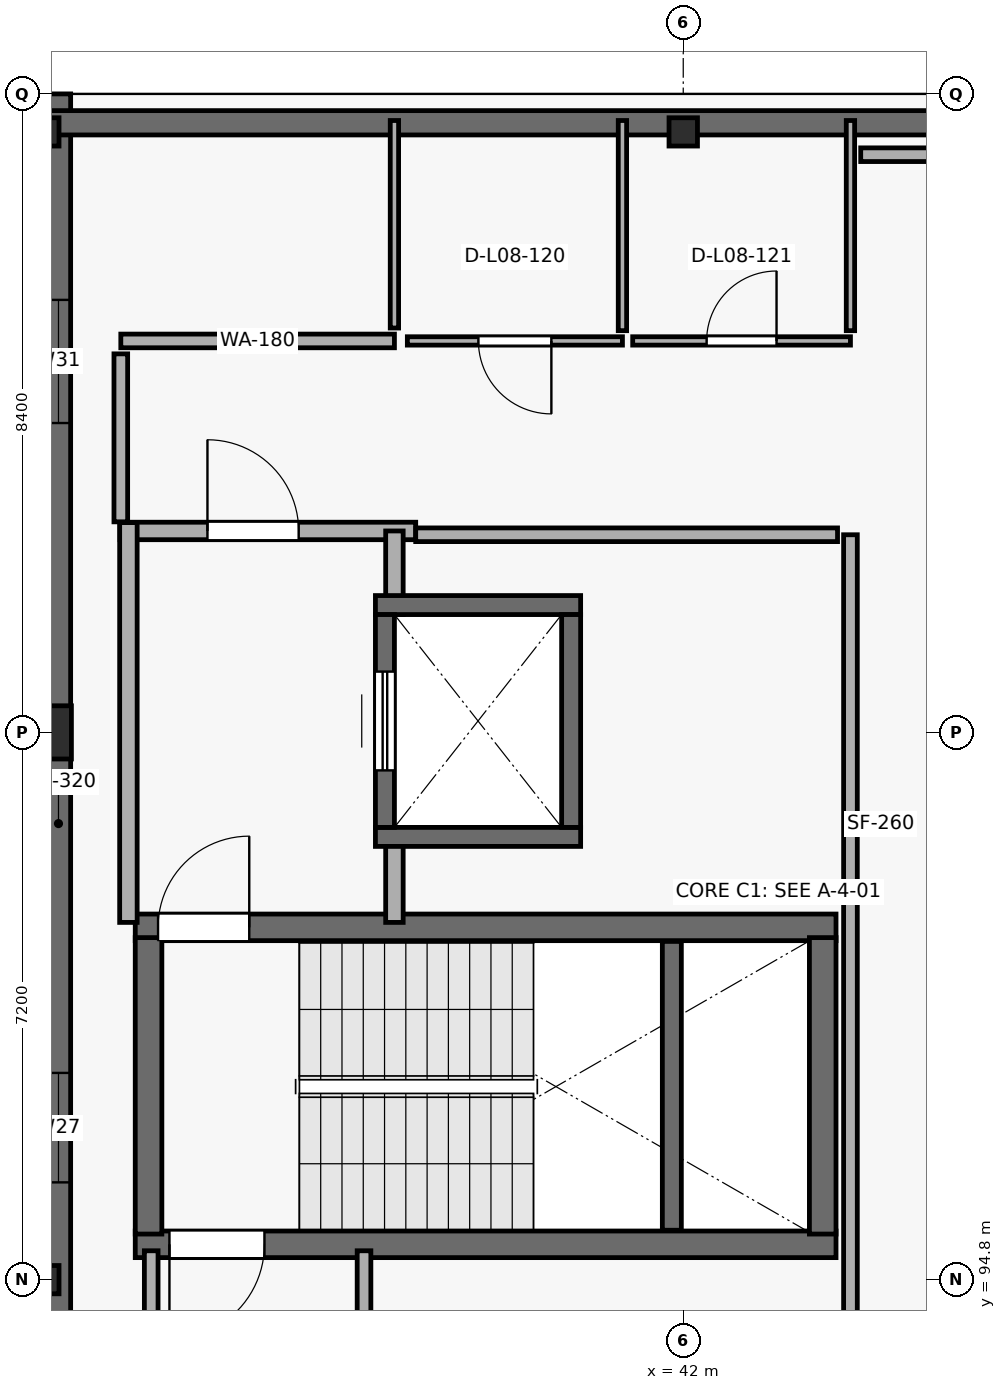
"""IFC4 building model, lengths in metres.
Left out: names, types, materials, properties, quantities, classifications, styles, units other than length and angle.
Written with IfcOpenShell. Run it as: python <this file> out.ifc"""

import sys

from ifc_helpers import new_model, si_unit, direction, frame, frame_2d, origin, origin_2d, place, context, subcontext, project, spatial, rectangle, i_section, extrude, element, fill, save


model = new_model("IFC4")
c1 = context("Model", 3, precision=1e-05, world=origin(), true_north=direction((0.0, 1.0)))
c2 = subcontext(c1, "Body", "Model", "MODEL_VIEW")
j1 = project(units=[si_unit("LENGTHUNIT", "METRE"), si_unit("PLANEANGLEUNIT", "RADIAN")], contexts=[c1])
p1 = place(None, origin())
s1 = spatial("IfcSite", under=j1, at=p1, CompositionType="ELEMENT")
p2 = place(p1, origin())
s2 = spatial("IfcBuilding", under=s1, at=p2, CompositionType="ELEMENT")
p3 = place(p2, frame((0.0, 0.0, 35.7)))
s3 = spatial("IfcBuildingStorey", under=s2, at=p3, CompositionType="ELEMENT", Elevation=35.7)
p4 = place(p3, frame((33.6, 94.8, 0.0), z_axis=(0.0, 0.0, 1.0), x_axis=(1.0, 0.0, 0.0)))
e1 = element("IfcColumn", 1, at=p4, inside=s3, PredefinedType="COLUMN", context=c2, shape_type="SweptSolid", body=[
    extrude(i_section(OverallWidth=0.374, OverallDepth=0.372, WebThickness=0.016, FlangeThickness=0.026, at=origin_2d()), origin(), (0.0, 0.0, 1.0), 4.5),
])
p5 = place(p3, frame((33.6, 102.0, 0.0), z_axis=(0.0, 0.0, 1.0), x_axis=(1.0, 0.0, 0.0)))
e2 = element("IfcColumn", 2, at=p5, inside=s3, PredefinedType="COLUMN", context=c2, shape_type="SweptSolid", body=[
    extrude(rectangle(XDim=0.7, YDim=0.7, at=origin_2d()), origin(), (0.0, 0.0, 1.0), 4.5),
])
for number, where, z_axis, x_axis in (
    (3, (33.6, 109.9, 0.0), (0.0, 0.0, 1.0), (1.0, 0.0, 0.0)),
    (4, (42.0, 109.9, 0.0), (0.0, 0.0, 1.0), (1.0, 0.0, 0.0)),
):
    element("IfcColumn", number, at=place(p3, frame(where, z_axis=z_axis, x_axis=x_axis)), inside=s3, PredefinedType="COLUMN", context=c2, shape_type="SweptSolid", body=[
        extrude(i_section(OverallWidth=0.374, OverallDepth=0.372, WebThickness=0.016, FlangeThickness=0.026, at=origin_2d()), origin(), (0.0, 0.0, 1.0), 4.5),
    ])
p6 = place(p3, frame((33.78, 91.2, 0.0), z_axis=(0.0, 0.0, 1.0), x_axis=(0.0, 1.0, 0.0)))
e5 = element("IfcWall", 5, at=p6, inside=s3, PredefinedType="SOLIDWALL", context=c2, shape_type="SweptSolid", body=[
    extrude(rectangle(XDim=19.2, YDim=0.32, at=frame_2d((9.6, 0.0))), origin(), (0.0, 0.0, 1.0), 4.24),
])
p7 = place(p6, frame((4.88, 0.0, 0.75)))
e6 = element("IfcOpeningElement", 6, at=p7, cuts=e5, PredefinedType="OPENING", context=c2, shape_type="SweptSolid", body=[
    extrude(rectangle(XDim=1.44, YDim=2.25, at=frame_2d((0.72, 1.125))), frame((0.0, 0.17, 0.0), z_axis=(0.0, -1.0, 0.0), x_axis=(1.0, 0.0, 0.0)), (0.0, 0.0, 1.0), 0.34),
])
p8 = place(p6, frame((14.87, 0.0, 0.75)))
e7 = element("IfcOpeningElement", 7, at=p8, cuts=e5, PredefinedType="OPENING", context=c2, shape_type="SweptSolid", body=[
    extrude(rectangle(XDim=1.62, YDim=1.85, at=frame_2d((0.81, 0.925))), frame((0.0, 0.17, 0.0), z_axis=(0.0, -1.0, 0.0), x_axis=(1.0, 0.0, 0.0)), (0.0, 0.0, 1.0), 0.34),
])
p9 = place(p3, frame((33.6, 110.02, 0.0), z_axis=(0.0, 0.0, 1.0), x_axis=(1.0, 0.0, 0.0)))
e8 = element("IfcWall", 8, at=p9, inside=s3, PredefinedType="SOLIDWALL", context=c2, shape_type="SweptSolid", body=[
    extrude(rectangle(XDim=33.6, YDim=0.32, at=frame_2d((16.8, 0.0))), origin(), (0.0, 0.0, 1.0), 4.24),
])
p10 = place(p3, frame((34.79, 95.265, 0.0), z_axis=(0.0, 0.0, 1.0), x_axis=(1.0, 0.0, 0.0)))
e9 = element("IfcWall", 9, at=p10, inside=s3, PredefinedType="SHEAR", context=c2, shape_type="SweptSolid", body=[
    extrude(rectangle(XDim=9.22, YDim=0.35, at=frame_2d((4.61, 0.0))), origin(), (0.0, 0.0, 1.0), 4.24),
])
p11 = place(p10, frame((0.45, 0.0, 0.0)))
e10 = element("IfcOpeningElement", 10, at=p11, cuts=e9, PredefinedType="OPENING", context=c2, shape_type="SweptSolid", body=[
    extrude(rectangle(XDim=1.25, YDim=2.2, at=frame_2d((0.625, 1.1))), frame((0.0, 0.185, 0.0), z_axis=(0.0, -1.0, 0.0), x_axis=(1.0, 0.0, 0.0)), (0.0, 0.0, 1.0), 0.37),
])
p12 = place(p3, frame((44.01, 99.435, 0.0), z_axis=(0.0, 0.0, 1.0), x_axis=(-1.0, 0.0, 0.0)))
e11 = element("IfcWall", 11, at=p12, inside=s3, PredefinedType="SHEAR", context=c2, shape_type="SweptSolid", body=[
    extrude(rectangle(XDim=9.22, YDim=0.35, at=frame_2d((4.61, 0.0))), origin(), (0.0, 0.0, 1.0), 4.24),
])
p13 = place(p12, frame((7.72, 0.0, 0.0)))
e12 = element("IfcOpeningElement", 12, at=p13, cuts=e11, PredefinedType="OPENING", context=c2, shape_type="SweptSolid", body=[
    extrude(rectangle(XDim=1.2, YDim=2.2, at=frame_2d((0.6, 1.1))), frame((0.0, 0.185, 0.0), z_axis=(0.0, -1.0, 0.0), x_axis=(1.0, 0.0, 0.0)), (0.0, 0.0, 1.0), 0.37),
])
for number, where, z_axis, x_axis in (
    (13, (34.965, 95.4, 0.0), (0.0, 0.0, 1.0), (0.0, 1.0, 0.0)),
    (14, (43.835, 99.3, 0.0), (0.0, 0.0, 1.0), (0.0, -1.0, 0.0)),
):
    element("IfcWall", number, at=place(p3, frame(where, z_axis=z_axis, x_axis=x_axis)), inside=s3, PredefinedType="SHEAR", context=c2, shape_type="SweptSolid", body=[
        extrude(rectangle(XDim=3.9, YDim=0.35, at=frame_2d((1.95, 0.0))), origin(), (0.0, 0.0, 1.0), 4.24),
    ])
p14 = place(p3, frame((41.85, 95.45, 0.0), z_axis=(0.0, 0.0, 1.0), x_axis=(0.0, 1.0, 0.0)))
e15 = element("IfcWall", 15, at=p14, inside=s3, PredefinedType="SHEAR", context=c2, shape_type="SweptSolid", body=[
    extrude(rectangle(XDim=3.8, YDim=0.25, at=frame_2d((1.9, 0.0))), origin(), (0.0, 0.0, 1.0), 2.07),
])
p15 = place(p3, frame((34.59, 104.65, 0.0), z_axis=(0.0, 0.0, 1.0), x_axis=(1.0, 0.0, 0.0)))
e16 = element("IfcWall", 16, at=p15, inside=s3, PredefinedType="PARTITIONING", context=c2, shape_type="SweptSolid", body=[
    extrude(rectangle(XDim=3.89, YDim=0.23, at=frame_2d((1.945, 0.0))), origin(), (0.0, 0.0, 1.0), 4.24),
])
p16 = place(p15, frame((1.15, 0.0, 0.0)))
e17 = element("IfcOpeningElement", 17, at=p16, cuts=e16, PredefinedType="OPENING", context=c2, shape_type="SweptSolid", body=[
    extrude(rectangle(XDim=1.2, YDim=2.2, at=frame_2d((0.6, 1.1))), frame((0.0, 0.125, 0.0), z_axis=(0.0, -1.0, 0.0), x_axis=(1.0, 0.0, 0.0)), (0.0, 0.0, 1.0), 0.25),
])
p17 = place(p3, frame((34.7, 99.5, 0.0), z_axis=(0.0, 0.0, 1.0), x_axis=(0.0, 1.0, 0.0)))
e18 = element("IfcWall", 18, at=p17, inside=s3, PredefinedType="PARTITIONING", context=c2, shape_type="SweptSolid", body=[
    extrude(rectangle(XDim=5.26, YDim=0.23, at=frame_2d((2.63, 0.0))), origin(), (0.0, 0.0, 1.0), 4.24),
])
p18 = place(p3, frame((38.2, 104.65, 0.0), z_axis=(0.0, 0.0, 1.0), x_axis=(0.0, -1.0, 0.0)))
e19 = element("IfcWall", 19, at=p18, inside=s3, PredefinedType="PARTITIONING", context=c2, shape_type="SweptSolid", body=[
    extrude(rectangle(XDim=1.1, YDim=0.23, at=frame_2d((0.55, 0.0))), origin(), (0.0, 0.0, 1.0), 4.24),
])
p19 = place(p3, frame((38.2, 100.75, 0.0), z_axis=(0.0, 0.0, 1.0), x_axis=(0.0, -1.0, 0.0)))
e20 = element("IfcWall", 20, at=p19, inside=s3, PredefinedType="PARTITIONING", context=c2, shape_type="SweptSolid", body=[
    extrude(rectangle(XDim=1.25, YDim=0.23, at=frame_2d((0.625, 0.0))), origin(), (0.0, 0.0, 1.0), 4.24),
])
for number, where, z_axis, x_axis in (
    (21, (37.95, 100.625, 0.0), (0.0, 0.0, 1.0), (1.0, 0.0, 0.0)),
    (22, (40.65, 103.675, 0.0), (0.0, 0.0, 1.0), (-1.0, 0.0, 0.0)),
):
    element("IfcWall", number, at=place(p3, frame(where, z_axis=z_axis, x_axis=x_axis)), inside=s3, PredefinedType="SHEAR", context=c2, shape_type="SweptSolid", body=[
        extrude(rectangle(XDim=2.7, YDim=0.25, at=frame_2d((1.35, 0.0))), origin(), (0.0, 0.0, 1.0), 4.24),
    ])
p20 = place(p3, frame((38.075, 100.75, 0.0), z_axis=(0.0, 0.0, 1.0), x_axis=(0.0, 1.0, 0.0)))
e23 = element("IfcWall", 23, at=p20, inside=s3, PredefinedType="SHEAR", context=c2, shape_type="SweptSolid", body=[
    extrude(rectangle(XDim=2.8, YDim=0.25, at=frame_2d((1.4, 0.0))), origin(), (0.0, 0.0, 1.0), 4.24),
])
p21 = place(p20, frame((0.75, 0.0, 0.0)))
e24 = element("IfcOpeningElement", 24, at=p21, cuts=e23, PredefinedType="OPENING", context=c2, shape_type="SweptSolid", body=[
    extrude(rectangle(XDim=1.3, YDim=2.25, at=frame_2d((0.65, 1.125))), frame((0.0, 0.135, 0.0), z_axis=(0.0, -1.0, 0.0), x_axis=(1.0, 0.0, 0.0)), (0.0, 0.0, 1.0), 0.27),
])
p22 = place(p3, frame((40.525, 103.55, 0.0), z_axis=(0.0, 0.0, 1.0), x_axis=(0.0, -1.0, 0.0)))
e25 = element("IfcWall", 25, at=p22, inside=s3, PredefinedType="SHEAR", context=c2, shape_type="SweptSolid", body=[
    extrude(rectangle(XDim=2.8, YDim=0.25, at=frame_2d((1.4, 0.0))), origin(), (0.0, 0.0, 1.0), 4.24),
])
p23 = place(p3, frame((44.2, 104.6, 0.0), z_axis=(0.0, 0.0, 1.0), x_axis=(0.0, -1.0, 0.0)))
e26 = element("IfcWall", 26, at=p23, inside=s3, PredefinedType="PARTITIONING", context=c2, shape_type="SweptSolid", body=[
    extrude(rectangle(XDim=10.75, YDim=0.18, at=frame_2d((5.375, 0.0))), origin(), (0.0, 0.0, 1.0), 4.24),
])
p24 = place(p3, frame((38.48, 104.6, 0.0), z_axis=(0.0, 0.0, 1.0), x_axis=(1.0, 0.0, 0.0)))
e27 = element("IfcWall", 27, at=p24, inside=s3, PredefinedType="PARTITIONING", context=c2, shape_type="SweptSolid", body=[
    extrude(rectangle(XDim=5.55, YDim=0.18, at=frame_2d((2.775, 0.0))), origin(), (0.0, 0.0, 1.0), 4.24),
])
p25 = place(p3, frame((38.2, 107.15, 0.0), z_axis=(0.0, 0.0, 1.0), x_axis=(-1.0, 0.0, 0.0)))
e28 = element("IfcWall", 28, at=p25, inside=s3, PredefinedType="PARTITIONING", context=c2, shape_type="SweptSolid", body=[
    extrude(rectangle(XDim=3.6, YDim=0.18, at=frame_2d((1.8, 0.0))), origin(), (0.0, 0.0, 1.0), 4.24),
])
p26 = place(p3, frame((41.2, 107.15, 0.0), z_axis=(0.0, 0.0, 1.0), x_axis=(-1.0, 0.0, 0.0)))
e29 = element("IfcWall", 29, at=p26, inside=s3, PredefinedType="PARTITIONING", context=c2, shape_type="SweptSolid", body=[
    extrude(rectangle(XDim=2.83, YDim=0.11, at=frame_2d((1.415, 0.0))), origin(), (0.0, 0.0, 1.0), 4.24),
])
p27 = place(p26, frame((0.935, 0.0, 0.0)))
e30 = element("IfcOpeningElement", 30, at=p27, cuts=e29, PredefinedType="OPENING", context=c2, shape_type="SweptSolid", body=[
    extrude(rectangle(XDim=0.96, YDim=2.14, at=frame_2d((0.48, 1.07))), frame((0.0, 0.065, 0.0), z_axis=(0.0, -1.0, 0.0), x_axis=(1.0, 0.0, 0.0)), (0.0, 0.0, 1.0), 0.13),
])
p28 = place(p3, frame((44.2, 107.15, 0.0), z_axis=(0.0, 0.0, 1.0), x_axis=(-1.0, 0.0, 0.0)))
e31 = element("IfcWall", 31, at=p28, inside=s3, PredefinedType="PARTITIONING", context=c2, shape_type="SweptSolid", body=[
    extrude(rectangle(XDim=2.865, YDim=0.11, at=frame_2d((1.433, 0.0))), origin(), (0.0, 0.0, 1.0), 4.24),
])
p29 = place(p28, frame((0.972, 0.0, 0.0)))
e32 = element("IfcOpeningElement", 32, at=p29, cuts=e31, PredefinedType="OPENING", context=c2, shape_type="SweptSolid", body=[
    extrude(rectangle(XDim=0.92, YDim=2.12, at=frame_2d((0.46, 1.06))), frame((0.0, 0.065, 0.0), z_axis=(0.0, -1.0, 0.0), x_axis=(1.0, 0.0, 0.0)), (0.0, 0.0, 1.0), 0.13),
])
p30 = place(p3, frame((41.2, 110.05, 0.0), z_axis=(0.0, 0.0, 1.0), x_axis=(0.0, -1.0, 0.0)))
e33 = element("IfcWall", 33, at=p30, inside=s3, PredefinedType="PARTITIONING", context=c2, shape_type="SweptSolid", body=[
    extrude(rectangle(XDim=2.765, YDim=0.11, at=frame_2d((1.383, 0.0))), origin(), (0.0, 0.0, 1.0), 4.24),
])
p31 = place(p3, frame((38.2, 107.32, 0.0), z_axis=(0.0, 0.0, 1.0), x_axis=(0.0, 1.0, 0.0)))
e34 = element("IfcWall", 34, at=p31, inside=s3, PredefinedType="PARTITIONING", context=c2, shape_type="SweptSolid", body=[
    extrude(rectangle(XDim=2.73, YDim=0.11, at=frame_2d((1.365, 0.0))), origin(), (0.0, 0.0, 1.0), 4.24),
])
p32 = place(p3, frame((44.2, 110.05, 0.0), z_axis=(0.0, 0.0, 1.0), x_axis=(0.0, -1.0, 0.0)))
e35 = element("IfcWall", 35, at=p32, inside=s3, PredefinedType="PARTITIONING", context=c2, shape_type="SweptSolid", body=[
    extrude(rectangle(XDim=2.765, YDim=0.11, at=frame_2d((1.383, 0.0))), origin(), (0.0, 0.0, 1.0), 4.24),
])
p33 = place(p3, frame((34.6, 106.98, 0.0), z_axis=(0.0, 0.0, 1.0), x_axis=(0.0, -1.0, 0.0)))
e36 = element("IfcWall", 36, at=p33, inside=s3, PredefinedType="PARTITIONING", context=c2, shape_type="SweptSolid", body=[
    extrude(rectangle(XDim=2.21, YDim=0.18, at=frame_2d((1.105, 0.0))), origin(), (0.0, 0.0, 1.0), 4.24),
])
p34 = place(p3, frame((46.23, 109.6, 0.0), z_axis=(0.0, 0.0, 1.0), x_axis=(-1.0, 0.0, 0.0)))
e37 = element("IfcWall", 37, at=p34, inside=s3, PredefinedType="PARTITIONING", context=c2, shape_type="SweptSolid", body=[
    extrude(rectangle(XDim=1.895, YDim=0.18, at=frame_2d((0.948, 0.0))), origin(), (0.0, 0.0, 1.0), 3.3),
])
p35 = place(p3, frame((37.8, 94.02, 0.0), z_axis=(0.0, 0.0, 1.0), x_axis=(0.0, 1.0, 0.0)))
e38 = element("IfcWall", 38, at=p35, inside=s3, PredefinedType="PARTITIONING", context=c2, shape_type="SweptSolid", body=[
    extrude(rectangle(XDim=1.16, YDim=0.18, at=frame_2d((0.58, 0.0))), origin(), (0.0, 0.0, 1.0), 4.24),
])
p36 = place(p3, frame((35.0, 95.18, 0.0), z_axis=(0.0, 0.0, 1.0), x_axis=(0.0, -1.0, 0.0)))
e39 = element("IfcWall", 39, at=p36, inside=s3, PredefinedType="PARTITIONING", context=c2, shape_type="SweptSolid", body=[
    extrude(rectangle(XDim=1.33, YDim=0.18, at=frame_2d((0.665, 0.0))), origin(), (0.0, 0.0, 1.0), 4.24),
])
p37 = place(p7, origin())
e40 = element("IfcWindow", 40, at=p37, inside=s3, PartitioningType="SINGLE_PANEL", PredefinedType="WINDOW", context=c2, shape_type="SweptSolid", body=[
    extrude(rectangle(XDim=1.44, YDim=2.25, at=frame_2d((0.72, 1.125))), frame((0.0, 0.03, 0.0), z_axis=(0.0, -1.0, 0.0), x_axis=(1.0, 0.0, 0.0)), (0.0, 0.0, 1.0), 0.06),
])
fill(e6, e40)
p38 = place(p8, origin())
e41 = element("IfcWindow", 41, at=p38, inside=s3, PartitioningType="SINGLE_PANEL", PredefinedType="WINDOW", context=c2, shape_type="SweptSolid", body=[
    extrude(rectangle(XDim=1.62, YDim=1.85, at=frame_2d((0.81, 0.925))), frame((0.0, 0.03, 0.0), z_axis=(0.0, -1.0, 0.0), x_axis=(1.0, 0.0, 0.0)), (0.0, 0.0, 1.0), 0.06),
])
fill(e7, e41)
p39 = place(p11, origin())
e42 = element("IfcDoor", 42, at=p39, inside=s3, OperationType="SINGLE_SWING_RIGHT", PredefinedType="DOOR", context=c2, shape_type="SweptSolid", body=[
    extrude(rectangle(XDim=1.25, YDim=2.2, at=frame_2d((0.625, 1.1))), frame((0.0, 0.025, 0.0), z_axis=(0.0, -1.0, 0.0), x_axis=(1.0, 0.0, 0.0)), (0.0, 0.0, 1.0), 0.05),
])
fill(e10, e42)
p40 = place(p13, origin())
e43 = element("IfcDoor", 43, at=p40, inside=s3, OperationType="SINGLE_SWING_RIGHT", PredefinedType="DOOR", context=c2, shape_type="SweptSolid", body=[
    extrude(rectangle(XDim=1.2, YDim=2.2, at=frame_2d((0.6, 1.1))), frame((0.0, 0.025, 0.0), z_axis=(0.0, -1.0, 0.0), x_axis=(1.0, 0.0, 0.0)), (0.0, 0.0, 1.0), 0.05),
])
fill(e12, e43)
p41 = place(p16, origin())
e44 = element("IfcDoor", 44, at=p41, inside=s3, OperationType="SINGLE_SWING_LEFT", PredefinedType="DOOR", context=c2, shape_type="SweptSolid", body=[
    extrude(rectangle(XDim=1.2, YDim=2.2, at=frame_2d((0.6, 1.1))), frame((0.0, 0.025, 0.0), z_axis=(0.0, -1.0, 0.0), x_axis=(1.0, 0.0, 0.0)), (0.0, 0.0, 1.0), 0.05),
])
fill(e17, e44)
p42 = place(p21, origin())
e45 = element("IfcDoor", 45, at=p42, inside=s3, OperationType="SLIDING_TO_LEFT", PredefinedType="DOOR", context=c2, shape_type="SweptSolid", body=[
    extrude(rectangle(XDim=1.3, YDim=2.25, at=frame_2d((0.65, 1.125))), frame((0.0, 0.025, 0.0), z_axis=(0.0, -1.0, 0.0), x_axis=(1.0, 0.0, 0.0)), (0.0, 0.0, 1.0), 0.05),
])
fill(e24, e45)
p43 = place(p27, origin())
e46 = element("IfcDoor", 46, at=p43, inside=s3, OperationType="SINGLE_SWING_LEFT", PredefinedType="DOOR", context=c2, shape_type="SweptSolid", body=[
    extrude(rectangle(XDim=0.96, YDim=2.14, at=frame_2d((0.48, 1.07))), frame((0.0, 0.025, 0.0), z_axis=(0.0, -1.0, 0.0), x_axis=(1.0, 0.0, 0.0)), (0.0, 0.0, 1.0), 0.05),
])
fill(e30, e46)
p44 = place(p29, origin())
e47 = element("IfcDoor", 47, at=p44, inside=s3, OperationType="SINGLE_SWING_RIGHT", PredefinedType="DOOR", context=c2, shape_type="SweptSolid", body=[
    extrude(rectangle(XDim=0.92, YDim=2.12, at=frame_2d((0.46, 1.06))), frame((0.0, 0.025, 0.0), z_axis=(0.0, -1.0, 0.0), x_axis=(1.0, 0.0, 0.0)), (0.0, 0.0, 1.0), 0.05),
])
fill(e32, e47)
save(model, sys.argv[1])
